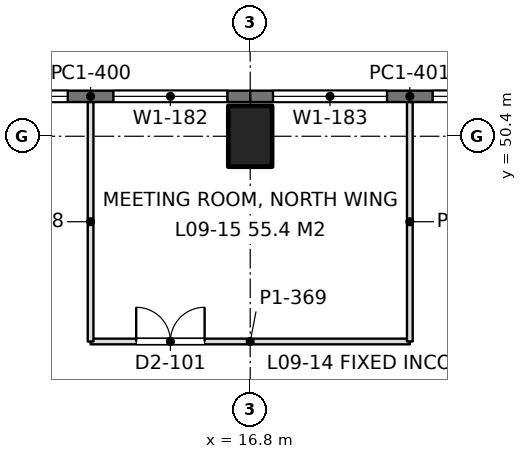
"""IFC4 building model, lengths in metres.
Left out: names, types, materials, properties, quantities, classifications, styles, units other than length and angle.
Written with IfcOpenShell. Run it as: python <this file> out.ifc"""

import sys

from ifc_helpers import new_model, si_unit, direction, frame, frame_2d, origin, origin_2d, place, context, subcontext, project, spatial, rectangle, extrude, element, fill, save


model = new_model("IFC4")
c1 = context("Model", 3, precision=1e-05, world=origin(), true_north=direction((0.0, 1.0)))
c2 = subcontext(c1, "Body", "Model", "MODEL_VIEW")
j1 = project(units=[si_unit("LENGTHUNIT", "METRE"), si_unit("PLANEANGLEUNIT", "RADIAN")], contexts=[c1])
p1 = place(None, origin())
s1 = spatial("IfcSite", under=j1, at=p1, CompositionType="ELEMENT")
p2 = place(p1, origin())
s2 = spatial("IfcBuilding", under=s1, at=p2, CompositionType="ELEMENT")
p3 = place(p2, frame((0.0, 0.0, 41.4)))
s3 = spatial("IfcBuildingStorey", under=s2, at=p3, CompositionType="ELEMENT", Elevation=41.4)
p4 = place(p3, frame((16.8, 50.4, 0.0), z_axis=(0.0, 0.0, 1.0), x_axis=(1.0, 0.0, 0.0)))
e1 = element("IfcColumn", 1, at=p4, inside=s3, PredefinedType="COLUMN", context=c2, shape_type="SweptSolid", body=[
    extrude(rectangle(XDim=1.15, YDim=1.6, at=origin_2d()), origin(), (0.0, 0.0, 1.0), 4.5),
])
p5 = place(p3, frame((8.4, 51.45, 0.0), z_axis=(0.0, 0.0, 1.0), x_axis=(1.0, 0.0, 0.0)))
e2 = element("IfcWall", 2, at=p5, inside=s3, PredefinedType="SOLIDWALL", context=c2, shape_type="SweptSolid", body=[
    extrude(rectangle(XDim=8.4, YDim=0.3, at=frame_2d((4.2, 0.0))), origin(), (0.0, 0.0, 1.0), 4.34),
])
p6 = place(p5, frame((0.6, 0.0, 0.9)))
e3 = element("IfcOpeningElement", 3, at=p6, cuts=e2, PredefinedType="OPENING", context=c2, shape_type="SweptSolid", body=[
    extrude(rectangle(XDim=3.0, YDim=1.9, at=frame_2d((1.5, 0.95))), frame((0.0, 0.16, 0.0), z_axis=(0.0, -1.0, 0.0), x_axis=(1.0, 0.0, 0.0)), (0.0, 0.0, 1.0), 0.32),
])
p7 = place(p5, frame((4.8, 0.0, 0.9)))
e4 = element("IfcOpeningElement", 4, at=p7, cuts=e2, PredefinedType="OPENING", context=c2, shape_type="SweptSolid", body=[
    extrude(rectangle(XDim=3.0, YDim=1.9, at=frame_2d((1.5, 0.95))), frame((0.0, 0.16, 0.0), z_axis=(0.0, -1.0, 0.0), x_axis=(1.0, 0.0, 0.0)), (0.0, 0.0, 1.0), 0.32),
])
p8 = place(p3, frame((16.8, 51.45, 0.0), z_axis=(0.0, 0.0, 1.0), x_axis=(1.0, 0.0, 0.0)))
e5 = element("IfcWall", 5, at=p8, inside=s3, PredefinedType="SOLIDWALL", context=c2, shape_type="SweptSolid", body=[
    extrude(rectangle(XDim=8.4, YDim=0.3, at=frame_2d((4.2, 0.0))), origin(), (0.0, 0.0, 1.0), 4.34),
])
p9 = place(p8, frame((0.6, 0.0, 0.9)))
e6 = element("IfcOpeningElement", 6, at=p9, cuts=e5, PredefinedType="OPENING", context=c2, shape_type="SweptSolid", body=[
    extrude(rectangle(XDim=3.0, YDim=1.9, at=frame_2d((1.5, 0.95))), frame((0.0, 0.16, 0.0), z_axis=(0.0, -1.0, 0.0), x_axis=(1.0, 0.0, 0.0)), (0.0, 0.0, 1.0), 0.32),
])
p10 = place(p8, frame((4.8, 0.0, 0.9)))
e7 = element("IfcOpeningElement", 7, at=p10, cuts=e5, PredefinedType="OPENING", context=c2, shape_type="SweptSolid", body=[
    extrude(rectangle(XDim=3.0, YDim=1.9, at=frame_2d((1.5, 0.95))), frame((0.0, 0.16, 0.0), z_axis=(0.0, -1.0, 0.0), x_axis=(1.0, 0.0, 0.0)), (0.0, 0.0, 1.0), 0.32),
])
p11 = place(p3, frame((12.6, 45.0, 0.0), z_axis=(0.0, 0.0, 1.0), x_axis=(1.0, 0.0, 0.0)))
e8 = element("IfcWall", 8, at=p11, inside=s3, PredefinedType="PARTITIONING", context=c2, shape_type="SweptSolid", body=[
    extrude(rectangle(XDim=8.4, YDim=0.15, at=frame_2d((4.2, 0.0))), origin(), (0.0, 0.0, 1.0), 3.74),
])
p12 = place(p11, frame((1.2, 0.0, 0.0)))
e9 = element("IfcOpeningElement", 9, at=p12, cuts=e8, PredefinedType="OPENING", context=c2, shape_type="SweptSolid", body=[
    extrude(rectangle(XDim=1.8, YDim=2.2, at=frame_2d((0.9, 1.1))), frame((0.0, 0.085, 0.0), z_axis=(0.0, -1.0, 0.0), x_axis=(1.0, 0.0, 0.0)), (0.0, 0.0, 1.0), 0.17),
])
for number, where, z_axis, x_axis in (
    (10, (12.6, 45.0, 0.0), (0.0, 0.0, 1.0), (0.0, 1.0, 0.0)),
    (11, (21.0, 45.0, 0.0), (0.0, 0.0, 1.0), (0.0, 1.0, 0.0)),
):
    element("IfcWall", number, at=place(p3, frame(where, z_axis=z_axis, x_axis=x_axis)), inside=s3, PredefinedType="PARTITIONING", context=c2, shape_type="SweptSolid", body=[
        extrude(rectangle(XDim=6.302, YDim=0.15, at=frame_2d((3.151, 0.0))), origin(), (0.0, 0.0, 1.0), 3.84),
    ])
p13 = place(p6, origin())
e12 = element("IfcWindow", 12, at=p13, inside=s3, PartitioningType="SINGLE_PANEL", PredefinedType="WINDOW", context=c2, shape_type="SweptSolid", body=[
    extrude(rectangle(XDim=3.0, YDim=1.9, at=frame_2d((1.5, 0.95))), frame((0.0, 0.03, 0.0), z_axis=(0.0, -1.0, 0.0), x_axis=(1.0, 0.0, 0.0)), (0.0, 0.0, 1.0), 0.06),
])
fill(e3, e12)
p14 = place(p7, origin())
e13 = element("IfcWindow", 13, at=p14, inside=s3, PartitioningType="SINGLE_PANEL", PredefinedType="WINDOW", context=c2, shape_type="SweptSolid", body=[
    extrude(rectangle(XDim=3.0, YDim=1.9, at=frame_2d((1.5, 0.95))), frame((0.0, 0.03, 0.0), z_axis=(0.0, -1.0, 0.0), x_axis=(1.0, 0.0, 0.0)), (0.0, 0.0, 1.0), 0.06),
])
fill(e4, e13)
p15 = place(p9, origin())
e14 = element("IfcWindow", 14, at=p15, inside=s3, PartitioningType="SINGLE_PANEL", PredefinedType="WINDOW", context=c2, shape_type="SweptSolid", body=[
    extrude(rectangle(XDim=3.0, YDim=1.9, at=frame_2d((1.5, 0.95))), frame((0.0, 0.03, 0.0), z_axis=(0.0, -1.0, 0.0), x_axis=(1.0, 0.0, 0.0)), (0.0, 0.0, 1.0), 0.06),
])
fill(e6, e14)
p16 = place(p10, origin())
e15 = element("IfcWindow", 15, at=p16, inside=s3, PartitioningType="SINGLE_PANEL", PredefinedType="WINDOW", context=c2, shape_type="SweptSolid", body=[
    extrude(rectangle(XDim=3.0, YDim=1.9, at=frame_2d((1.5, 0.95))), frame((0.0, 0.03, 0.0), z_axis=(0.0, -1.0, 0.0), x_axis=(1.0, 0.0, 0.0)), (0.0, 0.0, 1.0), 0.06),
])
fill(e7, e15)
p17 = place(p12, origin())
e16 = element("IfcDoor", 16, at=p17, inside=s3, OperationType="DOUBLE_DOOR_SINGLE_SWING", PredefinedType="DOOR", context=c2, shape_type="SweptSolid", body=[
    extrude(rectangle(XDim=1.8, YDim=2.2, at=frame_2d((0.9, 1.1))), frame((0.0, 0.025, 0.0), z_axis=(0.0, -1.0, 0.0), x_axis=(1.0, 0.0, 0.0)), (0.0, 0.0, 1.0), 0.05),
])
fill(e9, e16)
save(model, sys.argv[1])
